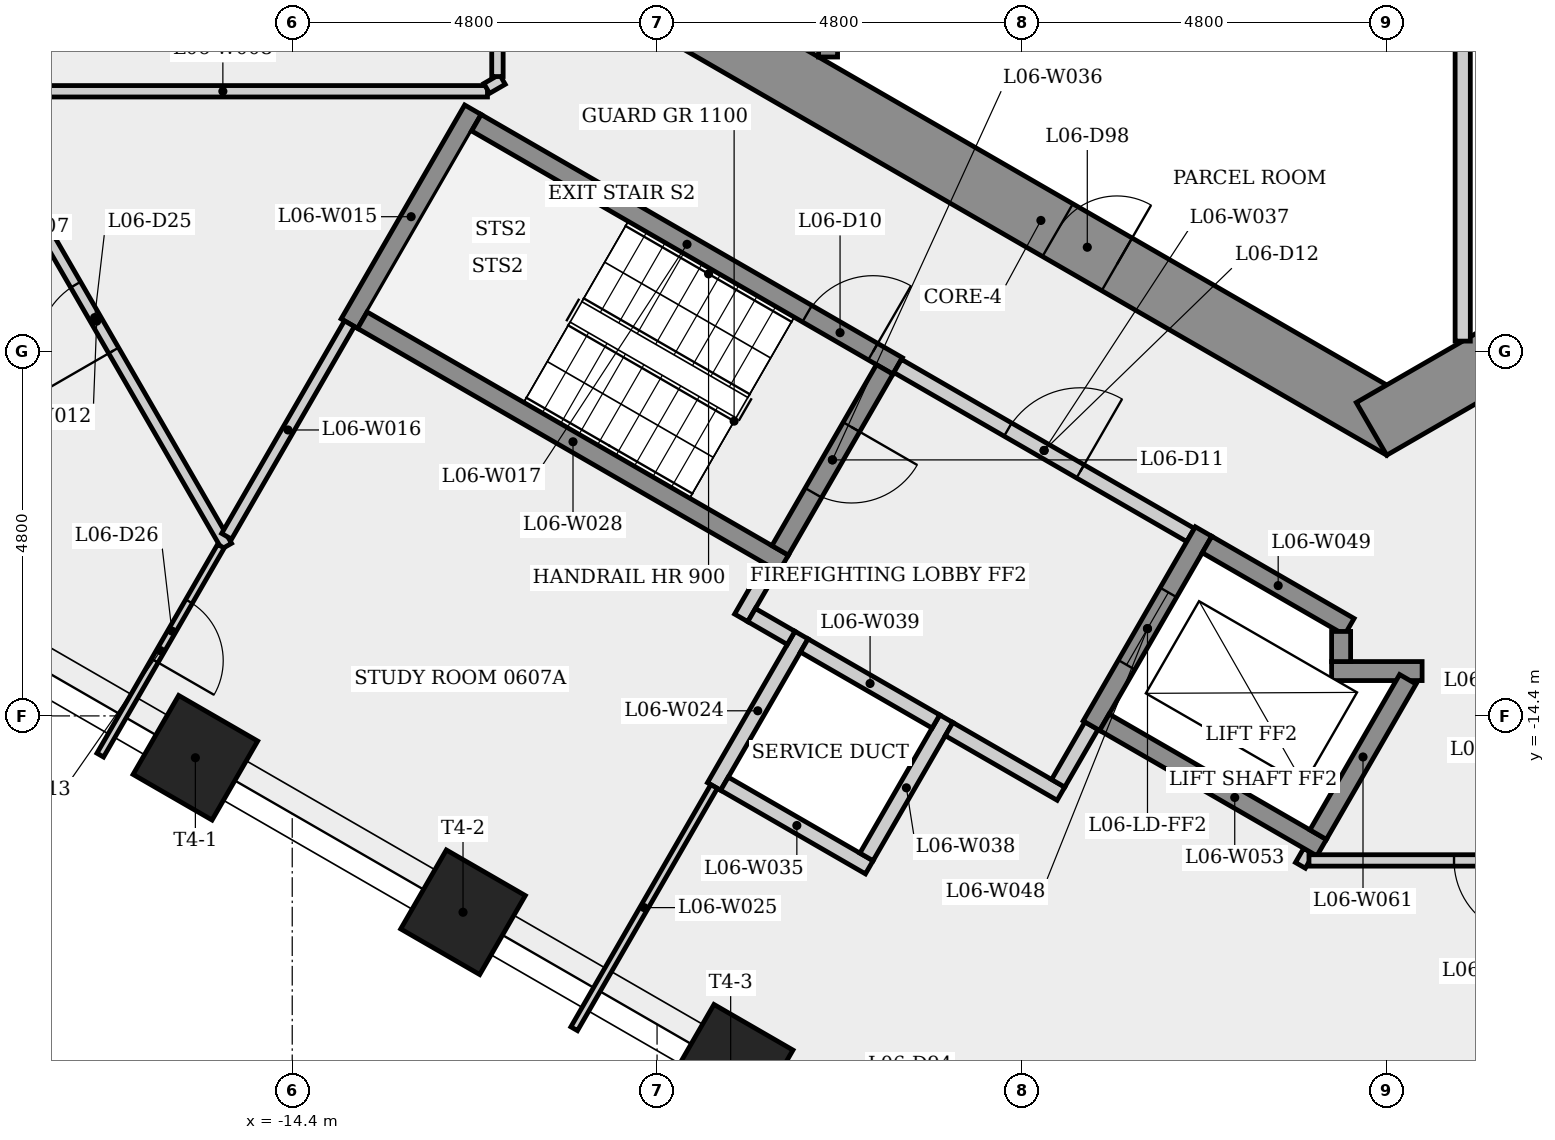
"""IFC4 building model, lengths in metres.
Left out: names, types, materials, properties, quantities, classifications, styles, units other than length and angle.
Written with IfcOpenShell. Run it as: python <this file> out.ifc"""

import sys

from ifc_helpers import new_model, si_unit, direction, frame, frame_2d, origin, origin_2d, place, context, subcontext, project, spatial, rectangle, extrude, element, fill, save


model = new_model("IFC4")
c1 = context("Model", 3, precision=1e-05, world=origin(), true_north=direction((0.0, 1.0)))
c2 = subcontext(c1, "Body", "Model", "MODEL_VIEW")
j1 = project(units=[si_unit("LENGTHUNIT", "METRE"), si_unit("PLANEANGLEUNIT", "RADIAN")], contexts=[c1])
p1 = place(None, origin())
s1 = spatial("IfcSite", under=j1, at=p1, CompositionType="ELEMENT")
p2 = place(p1, origin())
s2 = spatial("IfcBuilding", under=s1, at=p2, CompositionType="ELEMENT")
p3 = place(p2, frame((0.0, 0.0, 28.9)))
s3 = spatial("IfcBuildingStorey", under=s2, at=p3, CompositionType="ELEMENT", Elevation=28.9)
p4 = place(p3, frame((-9.3, -5.138, 0.0), z_axis=(0.0, 0.0, 1.0), x_axis=(0.866023993627, -0.500002442456, 0.0)))
e1 = element("IfcWall", 1, at=p4, inside=s3, PredefinedType="SHEAR", context=c2, shape_type="SweptSolid", body=[
    extrude(rectangle(XDim=10.97, YDim=0.8, at=frame_2d((5.485, 0.0))), origin(), (0.0, 0.0, 1.0), 3.4),
])
p5 = place(p4, frame((5.74, 0.0, 0.0)))
e2 = element("IfcOpeningElement", 2, at=p5, cuts=e1, PredefinedType="OPENING", context=c2, shape_type="SweptSolid", body=[
    extrude(rectangle(XDim=0.9, YDim=2.1, at=frame_2d((0.45, 1.05))), frame((0.0, 0.41, 0.0), z_axis=(0.0, -1.0, 0.0), x_axis=(1.0, 0.0, 0.0)), (0.0, 0.0, 1.0), 0.82),
])
p6 = place(p3, frame((-0.2, -10.623, 0.0), z_axis=(0.0, 0.0, 1.0), x_axis=(0.866023993627, 0.500002442456, 0.0)))
e3 = element("IfcWall", 3, at=p6, inside=s3, PredefinedType="SHEAR", context=c2, shape_type="SweptSolid", body=[
    extrude(rectangle(XDim=10.97, YDim=0.8, at=frame_2d((5.485, 0.0))), origin(), (0.0, 0.0, 1.0), 3.4),
])
p7 = place(p6, frame((7.224, 0.0, 0.0)))
e4 = element("IfcOpeningElement", 4, at=p7, cuts=e3, PredefinedType="OPENING", context=c2, shape_type="SweptSolid", body=[
    extrude(rectangle(XDim=0.9, YDim=2.1, at=frame_2d((0.45, 1.05))), frame((0.0, 0.41, 0.0), z_axis=(0.0, -1.0, 0.0), x_axis=(1.0, 0.0, 0.0)), (0.0, 0.0, 1.0), 0.82),
])
for number, where, z_axis, x_axis in (
    (5, (-15.674, -14.95, 0.0), (0.0, 0.0, 1.0), (-0.5, -0.866, 0.0)),
    (6, (-12.153, -16.983, 0.0), (0.0, 0.0, 1.0), (-0.5, -0.866, 0.0)),
    (7, (-8.632, -19.017, 0.0), (0.0, 0.0, 1.0), (-0.5, -0.866, 0.0)),
):
    element("IfcColumn", number, at=place(p3, frame(where, z_axis=z_axis, x_axis=x_axis)), inside=s3, PredefinedType="COLUMN", context=c2, shape_type="SweptSolid", body=[
        extrude(rectangle(XDim=1.2, YDim=1.2, at=origin_2d()), origin(), (0.0, 0.0, 1.0), 3.4),
    ])
p8 = place(p3, frame((-18.794, -6.181, 0.0), z_axis=(0.0, 0.0, 1.0), x_axis=(1.0, 0.0, 0.0)))
e8 = element("IfcWall", 8, at=p8, inside=s3, PredefinedType="PARTITIONING", context=c2, shape_type="SweptSolid", body=[
    extrude(rectangle(XDim=6.962, YDim=0.15, at=frame_2d((3.481, 0.0))), origin(), (0.0, 0.0, 1.0), 3.05),
])
p9 = place(p3, frame((-15.263, -12.167, 0.0), z_axis=(0.0, 0.0, 1.0), x_axis=(-0.500022320372, 0.866012516728, 0.0)))
e9 = element("IfcWall", 9, at=p9, inside=s3, PredefinedType="PARTITIONING", context=c2, shape_type="SweptSolid", body=[
    extrude(rectangle(XDim=6.836, YDim=0.15, at=frame_2d((3.418, 0.0))), origin(), (0.0, 0.0, 1.0), 3.05),
])
p10 = place(p9, frame((2.973, 0.0, 0.0)))
e10 = element("IfcOpeningElement", 10, at=p10, cuts=e9, PredefinedType="OPENING", context=c2, shape_type="SweptSolid", body=[
    extrude(rectangle(XDim=1.0, YDim=2.1, at=frame_2d((0.5, 1.05))), frame((0.0, 0.085, 0.0), z_axis=(0.0, -1.0, 0.0), x_axis=(1.0, 0.0, 0.0)), (0.0, 0.0, 1.0), 0.17),
])
p11 = place(p3, frame((-15.338, -12.167, 0.0), z_axis=(0.0, 0.0, 1.0), x_axis=(-0.500017526161, -0.866015284814, 0.0)))
e11 = element("IfcWall", 11, at=p11, inside=s3, PredefinedType="PARTITIONING", context=c2, shape_type="SweptSolid", body=[
    extrude(rectangle(XDim=3.175, YDim=0.1, at=frame_2d((1.588, 0.0))), origin(), (0.0, 0.0, 1.0), 3.05),
])
p12 = place(p11, frame((0.84, 0.0, 0.0)))
e12 = element("IfcOpeningElement", 12, at=p12, cuts=e11, PredefinedType="OPENING", context=c2, shape_type="SweptSolid", body=[
    extrude(rectangle(XDim=0.9, YDim=2.1, at=frame_2d((0.45, 1.05))), frame((0.0, 0.06, 0.0), z_axis=(0.0, -1.0, 0.0), x_axis=(1.0, 0.0, 0.0)), (0.0, 0.0, 1.0), 0.12),
])
p13 = place(p3, frame((-13.648, -9.239, 0.0), z_axis=(0.0, 0.0, 1.0), x_axis=(0.500017246033, 0.866015446554, 0.0)))
e13 = element("IfcWall", 13, at=p13, inside=s3, PredefinedType="SHEAR", context=c2, shape_type="SweptSolid", body=[
    extrude(rectangle(XDim=3.25, YDim=0.25, at=frame_2d((1.625, 0.0))), origin(), (0.0, 0.0, 1.0), 3.05),
])
p14 = place(p3, frame((-13.648, -9.239, 0.0), z_axis=(0.0, 0.0, 1.0), x_axis=(-0.500032073372, -0.866006885423, 0.0)))
e14 = element("IfcWall", 14, at=p14, inside=s3, PredefinedType="PARTITIONING", context=c2, shape_type="SweptSolid", body=[
    extrude(rectangle(XDim=3.231, YDim=0.15, at=frame_2d((1.615, 0.0))), origin(), (0.0, 0.0, 1.0), 3.05),
])
p15 = place(p3, frame((-11.977, -6.595, 0.0), z_axis=(0.0, 0.0, 1.0), x_axis=(0.866025499775, -0.499999833739, 0.0)))
e15 = element("IfcWall", 15, at=p15, inside=s3, PredefinedType="SHEAR", context=c2, shape_type="SweptSolid", body=[
    extrude(rectangle(XDim=6.4, YDim=0.25, at=frame_2d((3.2, 0.0))), origin(), (0.0, 0.0, 1.0), 3.05),
])
p16 = place(p15, frame((5.025, 0.0, 0.0)))
e16 = element("IfcOpeningElement", 16, at=p16, cuts=e15, PredefinedType="OPENING", context=c2, shape_type="SweptSolid", body=[
    extrude(rectangle(XDim=1.0, YDim=2.1, at=frame_2d((0.5, 1.05))), frame((0.0, 0.135, 0.0), z_axis=(0.0, -1.0, 0.0), x_axis=(1.0, 0.0, 0.0)), (0.0, 0.0, 1.0), 0.27),
])
p17 = place(p3, frame((-11.841, -6.144, 0.0), z_axis=(0.0, 0.0, 1.0), x_axis=(0.865963705197, 0.500106849865, 0.0)))
e17 = element("IfcWall", 17, at=p17, inside=s3, PredefinedType="PARTITIONING", context=c2, shape_type="SweptSolid", body=[
    extrude(rectangle(XDim=0.238, YDim=0.15, at=frame_2d((0.119, 0.0))), origin(), (0.0, 0.0, 1.0), 3.05),
])
p18 = place(p3, frame((-11.7, -5.987, 0.0), z_axis=(0.0, 0.0, 1.0), x_axis=(0.0, 1.0, 0.0)))
e18 = element("IfcWall", 18, at=p18, inside=s3, PredefinedType="PARTITIONING", context=c2, shape_type="SweptSolid", body=[
    extrude(rectangle(XDim=11.975, YDim=0.15, at=frame_2d((5.987, 0.0))), origin(), (0.0, 0.0, 1.0), 3.05),
])
p19 = place(p18, frame((5.487, 0.0, 0.0)))
e19 = element("IfcOpeningElement", 19, at=p19, cuts=e18, PredefinedType="OPENING", context=c2, shape_type="SweptSolid", body=[
    extrude(rectangle(XDim=1.0, YDim=2.1, at=frame_2d((0.5, 1.05))), frame((0.0, 0.085, 0.0), z_axis=(0.0, -1.0, 0.0), x_axis=(1.0, 0.0, 0.0)), (0.0, 0.0, 1.0), 0.17),
])
p20 = place(p3, frame((-8.85, -15.329, 0.0), z_axis=(0.0, 0.0, 1.0), x_axis=(0.500077740698, 0.865980515519, 0.0)))
e20 = element("IfcWall", 20, at=p20, inside=s3, PredefinedType="PLUMBINGWALL", context=c2, shape_type="SweptSolid", body=[
    extrude(rectangle(XDim=2.3, YDim=0.2, at=frame_2d((1.15, 0.0))), origin(), (0.0, 0.0, 1.0), 3.05),
])
p21 = place(p3, frame((-8.85, -15.329, 0.0), z_axis=(0.0, 0.0, 1.0), x_axis=(-0.499955964762, -0.866050826049, 0.0)))
e21 = element("IfcWall", 21, at=p21, inside=s3, PredefinedType="PARTITIONING", context=c2, shape_type="SweptSolid", body=[
    extrude(rectangle(XDim=3.68, YDim=0.1, at=frame_2d((1.84, 0.0))), origin(), (0.0, 0.0, 1.0), 3.05),
])
p22 = place(p3, frame((-8.493, -13.11, 0.0), z_axis=(0.0, 0.0, 1.0), x_axis=(0.500067724834, 0.865986299303, 0.0)))
e22 = element("IfcWall", 22, at=p22, inside=s3, PredefinedType="PARTITIONING", context=c2, shape_type="SweptSolid", body=[
    extrude(rectangle(XDim=0.775, YDim=0.2, at=frame_2d((0.388, 0.0))), origin(), (0.0, 0.0, 1.0), 3.05),
])
p23 = place(p3, frame((-7.935, -12.393, 0.0), z_axis=(0.0, 0.0, 1.0), x_axis=(-0.866025499775, 0.499999833739, 0.0)))
e23 = element("IfcWall", 23, at=p23, inside=s3, PredefinedType="SHEAR", context=c2, shape_type="SweptSolid", body=[
    extrude(rectangle(XDim=6.4, YDim=0.25, at=frame_2d((3.2, 0.0))), origin(), (0.0, 0.0, 1.0), 3.05),
])
p24 = place(p3, frame((-7.836, -13.373, 0.0), z_axis=(0.0, 0.0, 1.0), x_axis=(-0.866232998003, 0.499640263761, 0.0)))
e24 = element("IfcWall", 24, at=p24, inside=s3, PredefinedType="PARTITIONING", context=c2, shape_type="SweptSolid", body=[
    extrude(rectangle(XDim=0.6, YDim=0.2, at=frame_2d((0.3, 0.0))), origin(), (0.0, 0.0, 1.0), 3.05),
])
p25 = place(p3, frame((-7.35, -5.73, 0.0), z_axis=(0.0, 0.0, 1.0), x_axis=(0.0, 1.0, 0.0)))
e25 = element("IfcWall", 25, at=p25, inside=s3, PredefinedType="SHEAR", context=c2, shape_type="SweptSolid", body=[
    extrude(rectangle(XDim=4.055, YDim=0.25, at=frame_2d((2.028, 0.0))), origin(), (0.0, 0.0, 1.0), 3.05),
])
p26 = place(p3, frame((-6.808, -16.392, 0.0), z_axis=(0.0, 0.0, 1.0), x_axis=(-0.866008176907, 0.50002983664, 0.0)))
e26 = element("IfcWall", 26, at=p26, inside=s3, PredefinedType="PLUMBINGWALL", context=c2, shape_type="SweptSolid", body=[
    extrude(rectangle(XDim=2.2, YDim=0.2, at=frame_2d((1.1, 0.0))), origin(), (0.0, 0.0, 1.0), 3.05),
])
p27 = place(p3, frame((-6.605, -9.841, 0.0), z_axis=(0.0, 0.0, 1.0), x_axis=(-0.499996545922, -0.866027397988, 0.0)))
e27 = element("IfcWall", 27, at=p27, inside=s3, PredefinedType="SHEAR", context=c2, shape_type="SweptSolid", body=[
    extrude(rectangle(XDim=2.75, YDim=0.25, at=frame_2d((1.375, 0.0))), origin(), (0.0, 0.0, 1.0), 3.05),
])
p28 = place(p27, frame((0.875, 0.0, 0.0)))
e28 = element("IfcOpeningElement", 28, at=p28, cuts=e27, PredefinedType="OPENING", context=c2, shape_type="SweptSolid", body=[
    extrude(rectangle(XDim=1.0, YDim=2.1, at=frame_2d((0.5, 1.05))), frame((0.0, 0.135, 0.0), z_axis=(0.0, -1.0, 0.0), x_axis=(1.0, 0.0, 0.0)), (0.0, 0.0, 1.0), 0.27),
])
p29 = place(p3, frame((-6.435, -9.795, 0.0), z_axis=(0.0, 0.0, 1.0), x_axis=(0.866012907634, -0.500021643343, 0.0)))
e29 = element("IfcWall", 29, at=p29, inside=s3, PredefinedType="PARTITIONING", context=c2, shape_type="SweptSolid", body=[
    extrude(rectangle(XDim=4.45, YDim=0.2, at=frame_2d((2.225, 0.0))), origin(), (0.0, 0.0, 1.0), 3.05),
])
p30 = place(p29, frame((1.675, 0.0, 0.0)))
e30 = element("IfcOpeningElement", 30, at=p30, cuts=e29, PredefinedType="OPENING", context=c2, shape_type="SweptSolid", body=[
    extrude(rectangle(XDim=1.1, YDim=2.1, at=frame_2d((0.55, 1.05))), frame((0.0, 0.11, 0.0), z_axis=(0.0, -1.0, 0.0), x_axis=(1.0, 0.0, 0.0)), (0.0, 0.0, 1.0), 0.22),
])
p31 = place(p3, frame((-5.795, -14.437, 0.0), z_axis=(0.0, 0.0, 1.0), x_axis=(-0.500027713859, -0.866009402589, 0.0)))
e31 = element("IfcWall", 31, at=p31, inside=s3, PredefinedType="PLUMBINGWALL", context=c2, shape_type="SweptSolid", body=[
    extrude(rectangle(XDim=2.1, YDim=0.2, at=frame_2d((1.05, 0.0))), origin(), (0.0, 0.0, 1.0), 3.05),
])
p32 = place(p3, frame((-5.931, -14.473, 0.0), z_axis=(0.0, 0.0, 1.0), x_axis=(-0.866041268327, 0.499972520799, 0.0)))
e32 = element("IfcWall", 32, at=p32, inside=s3, PredefinedType="PLUMBINGWALL", context=c2, shape_type="SweptSolid", body=[
    extrude(rectangle(XDim=2.0, YDim=0.2, at=frame_2d((1.0, 0.0))), origin(), (0.0, 0.0, 1.0), 3.05),
])
p33 = place(p3, frame((-4.286, -15.423, 0.0), z_axis=(0.0, 0.0, 1.0), x_axis=(-0.866025371046, 0.500000056704, 0.0)))
e33 = element("IfcWall", 33, at=p33, inside=s3, PredefinedType="PARTITIONING", context=c2, shape_type="SweptSolid", body=[
    extrude(rectangle(XDim=1.7, YDim=0.2, at=frame_2d((0.85, 0.0))), origin(), (0.0, 0.0, 1.0), 3.05),
])
p34 = place(p3, frame((-3.885, -14.529, 0.0), z_axis=(0.0, 0.0, 1.0), x_axis=(-0.499859285417, -0.866106630146, 0.0)))
e34 = element("IfcWall", 34, at=p34, inside=s3, PredefinedType="PARTITIONING", context=c2, shape_type="SweptSolid", body=[
    extrude(rectangle(XDim=0.875, YDim=0.2, at=frame_2d((0.438, 0.0))), origin(), (0.0, 0.0, 1.0), 3.05),
])
p35 = place(p3, frame((-2.41, -11.974, 0.0), z_axis=(0.0, 0.0, 1.0), x_axis=(-0.500001826776, -0.866024349092, 0.0)))
e35 = element("IfcWall", 35, at=p35, inside=s3, PredefinedType="SHEAR", context=c2, shape_type="SweptSolid", body=[
    extrude(rectangle(XDim=2.95, YDim=0.25, at=frame_2d((1.475, 0.0))), origin(), (0.0, 0.0, 1.0), 3.05),
])
p36 = place(p35, frame((0.925, 0.0, 0.0)))
e36 = element("IfcOpeningElement", 36, at=p36, cuts=e35, PredefinedType="OPENING", context=c2, shape_type="SweptSolid", body=[
    extrude(rectangle(XDim=1.1, YDim=2.1, at=frame_2d((0.55, 1.05))), frame((0.0, 0.135, 0.0), z_axis=(0.0, -1.0, 0.0), x_axis=(1.0, 0.0, 0.0)), (0.0, 0.0, 1.0), 0.27),
])
p37 = place(p3, frame((-2.364, -12.145, 0.0), z_axis=(0.0, 0.0, 1.0), x_axis=(0.86603892542, -0.499976579108, 0.0)))
e37 = element("IfcWall", 37, at=p37, inside=s3, PredefinedType="SHEAR", context=c2, shape_type="SweptSolid", body=[
    extrude(rectangle(XDim=2.162, YDim=0.25, at=frame_2d((1.081, 0.0))), origin(), (0.0, 0.0, 1.0), 3.05),
])
p38 = place(p3, frame((-1.135, -16.367, 0.0), z_axis=(0.0, 0.0, 1.0), x_axis=(0.500014901547, 0.866016800201, 0.0)))
e38 = element("IfcWall", 38, at=p38, inside=s3, PredefinedType="PARTITIONING", context=c2, shape_type="SweptSolid", body=[
    extrude(rectangle(XDim=0.217, YDim=0.15, at=frame_2d((0.108, 0.0))), origin(), (0.0, 0.0, 1.0), 3.05),
])
p39 = place(p3, frame((-0.856, -16.133, 0.0), z_axis=(0.0, 0.0, 1.0), x_axis=(-0.866021716278, 0.500006386895, 0.0)))
e39 = element("IfcWall", 39, at=p39, inside=s3, PredefinedType="SHEAR", context=c2, shape_type="SweptSolid", body=[
    extrude(rectangle(XDim=3.3, YDim=0.25, at=frame_2d((1.65, 0.0))), origin(), (0.0, 0.0, 1.0), 3.05),
])
p40 = place(p3, frame((-0.725, -13.81, 0.0), z_axis=(0.0, 0.0, 1.0), x_axis=(1.0, 0.0, 0.0)))
e40 = element("IfcWall", 40, at=p40, inside=s3, PredefinedType="SHEAR", context=c2, shape_type="SweptSolid", body=[
    extrude(rectangle(XDim=1.191, YDim=0.25, at=frame_2d((0.595, 0.0))), origin(), (0.0, 0.0, 1.0), 3.05),
])
p41 = place(p3, frame((-0.6, -13.289, 0.0), z_axis=(0.0, 0.0, 1.0), x_axis=(0.0, -1.0, 0.0)))
e41 = element("IfcWall", 41, at=p41, inside=s3, PredefinedType="SHEAR", context=c2, shape_type="SweptSolid", body=[
    extrude(rectangle(XDim=0.396, YDim=0.25, at=frame_2d((0.198, 0.0))), origin(), (0.0, 0.0, 1.0), 3.4),
])
p42 = place(p3, frame((0.278, -13.918, 0.0), z_axis=(0.0, 0.0, 1.0), x_axis=(-0.49998806882, -0.866032292145, 0.0)))
e42 = element("IfcWall", 42, at=p42, inside=s3, PredefinedType="SHEAR", context=c2, shape_type="SweptSolid", body=[
    extrude(rectangle(XDim=2.36, YDim=0.25, at=frame_2d((1.18, 0.0))), origin(), (0.0, 0.0, 1.0), 3.4),
])
p43 = place(p3, frame((1.0, -5.275, 0.0), z_axis=(0.0, 0.0, 1.0), x_axis=(0.0, -1.0, 0.0)))
e43 = element("IfcWall", 43, at=p43, inside=s3, PredefinedType="PARTITIONING", context=c2, shape_type="SweptSolid", body=[
    extrude(rectangle(XDim=4.194, YDim=0.2, at=frame_2d((2.097, 0.0))), origin(), (0.0, 0.0, 1.0), 3.05),
])
p44 = place(p3, frame((3.794, -16.302, 0.0), z_axis=(0.0, 0.0, 1.0), x_axis=(-1.0, 0.0, 0.0)))
e44 = element("IfcWall", 44, at=p44, inside=s3, PredefinedType="PARTITIONING", context=c2, shape_type="SweptSolid", body=[
    extrude(rectangle(XDim=4.817, YDim=0.15, at=frame_2d((2.409, 0.0))), origin(), (0.0, 0.0, 1.0), 3.05),
])
p45 = place(p44, frame((1.908, 0.0, 0.0)))
e45 = element("IfcOpeningElement", 45, at=p45, cuts=e44, PredefinedType="OPENING", context=c2, shape_type="SweptSolid", body=[
    extrude(rectangle(XDim=1.0, YDim=2.1, at=frame_2d((0.5, 1.05))), frame((0.0, 0.085, 0.0), z_axis=(0.0, -1.0, 0.0), x_axis=(1.0, 0.0, 0.0)), (0.0, 0.0, 1.0), 0.17),
])
p46 = place(p16, origin())
e46 = element("IfcDoor", 46, at=p46, inside=s3, OperationType="SINGLE_SWING_RIGHT", PredefinedType="DOOR", context=c2, shape_type="SweptSolid", body=[
    extrude(rectangle(XDim=1.0, YDim=2.1, at=frame_2d((0.5, 1.05))), frame((0.0, 0.025, 0.0), z_axis=(0.0, -1.0, 0.0), x_axis=(1.0, 0.0, 0.0)), (0.0, 0.0, 1.0), 0.05),
])
fill(e16, e46)
p47 = place(p28, origin())
e47 = element("IfcDoor", 47, at=p47, inside=s3, OperationType="SINGLE_SWING_LEFT", PredefinedType="DOOR", context=c2, shape_type="SweptSolid", body=[
    extrude(rectangle(XDim=1.0, YDim=2.1, at=frame_2d((0.5, 1.05))), frame((0.0, 0.025, 0.0), z_axis=(0.0, -1.0, 0.0), x_axis=(1.0, 0.0, 0.0)), (0.0, 0.0, 1.0), 0.05),
])
fill(e28, e47)
p48 = place(p30, origin())
e48 = element("IfcDoor", 48, at=p48, inside=s3, OperationType="SINGLE_SWING_RIGHT", PredefinedType="DOOR", context=c2, shape_type="SweptSolid", body=[
    extrude(rectangle(XDim=1.1, YDim=2.1, at=frame_2d((0.55, 1.05))), frame((0.0, 0.025, 0.0), z_axis=(0.0, -1.0, 0.0), x_axis=(1.0, 0.0, 0.0)), (0.0, 0.0, 1.0), 0.05),
])
fill(e30, e48)
p49 = place(p36, origin())
e49 = element("IfcDoor", 49, at=p49, inside=s3, OperationType="SLIDING_TO_LEFT", PredefinedType="DOOR", context=c2, shape_type="SweptSolid", body=[
    extrude(rectangle(XDim=1.1, YDim=2.1, at=frame_2d((0.55, 1.05))), frame((0.0, 0.025, 0.0), z_axis=(0.0, -1.0, 0.0), x_axis=(1.0, 0.0, 0.0)), (0.0, 0.0, 1.0), 0.05),
])
fill(e36, e49)
p50 = place(p10, origin())
e50 = element("IfcDoor", 50, at=p50, inside=s3, OperationType="SINGLE_SWING_LEFT", PredefinedType="DOOR", context=c2, shape_type="SweptSolid", body=[
    extrude(rectangle(XDim=1.0, YDim=2.1, at=frame_2d((0.5, 1.05))), frame((0.0, 0.025, 0.0), z_axis=(0.0, -1.0, 0.0), x_axis=(1.0, 0.0, 0.0)), (0.0, 0.0, 1.0), 0.05),
])
fill(e10, e50)
p51 = place(p12, origin())
e51 = element("IfcDoor", 51, at=p51, inside=s3, OperationType="SINGLE_SWING_RIGHT", PredefinedType="DOOR", context=c2, shape_type="SweptSolid", body=[
    extrude(rectangle(XDim=0.9, YDim=2.1, at=frame_2d((0.45, 1.05))), frame((0.0, 0.025, 0.0), z_axis=(0.0, -1.0, 0.0), x_axis=(1.0, 0.0, 0.0)), (0.0, 0.0, 1.0), 0.05),
])
fill(e12, e51)
p52 = place(p45, origin())
e52 = element("IfcDoor", 52, at=p52, inside=s3, OperationType="SINGLE_SWING_LEFT", PredefinedType="DOOR", context=c2, shape_type="SweptSolid", body=[
    extrude(rectangle(XDim=1.0, YDim=2.1, at=frame_2d((0.5, 1.05))), frame((0.0, 0.025, 0.0), z_axis=(0.0, -1.0, 0.0), x_axis=(1.0, 0.0, 0.0)), (0.0, 0.0, 1.0), 0.05),
])
fill(e45, e52)
p53 = place(p5, origin())
e53 = element("IfcDoor", 53, at=p53, inside=s3, OperationType="SINGLE_SWING_RIGHT", PredefinedType="DOOR", context=c2, shape_type="SweptSolid", body=[
    extrude(rectangle(XDim=0.9, YDim=2.1, at=frame_2d((0.45, 1.05))), frame((0.0, 0.025, 0.0), z_axis=(0.0, -1.0, 0.0), x_axis=(1.0, 0.0, 0.0)), (0.0, 0.0, 1.0), 0.05),
])
fill(e2, e53)
save(model, sys.argv[1])
